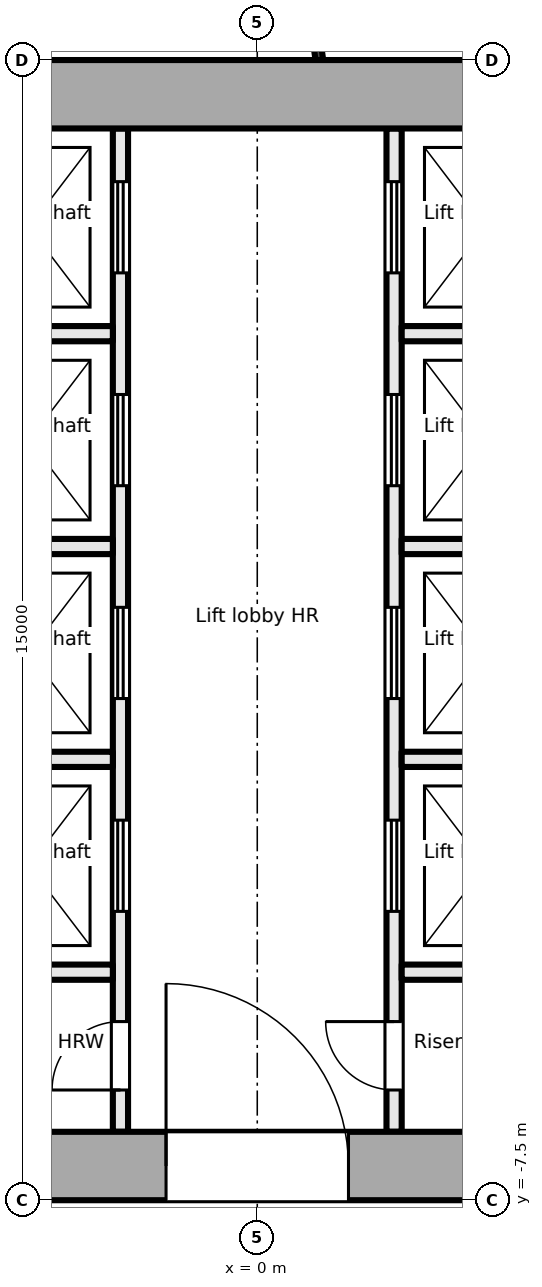
"""IFC4 building model, lengths in metres.
Left out: names, types, materials, properties, quantities, classifications, styles, units other than length and angle.
Written with IfcOpenShell. Run it as: python <this file> out.ifc"""

import sys

from ifc_helpers import new_model, si_unit, direction, frame, frame_2d, origin, place, context, subcontext, project, spatial, rectangle, extrude, element, fill, save


model = new_model("IFC4")
c1 = context("Model", 3, precision=1e-05, world=origin(), true_north=direction((0.0, 1.0)))
c2 = subcontext(c1, "Body", "Model", "MODEL_VIEW")
j1 = project(units=[si_unit("LENGTHUNIT", "METRE"), si_unit("PLANEANGLEUNIT", "RADIAN")], contexts=[c1])
p1 = place(None, origin())
s1 = spatial("IfcSite", under=j1, at=p1, CompositionType="ELEMENT")
p2 = place(p1, origin())
s2 = spatial("IfcBuilding", under=s1, at=p2, CompositionType="ELEMENT")
p3 = place(p2, frame((0.0, 0.0, 176.3)))
s3 = spatial("IfcBuildingStorey", under=s2, at=p3, CompositionType="ELEMENT", Elevation=176.3)
p4 = place(p3, frame((-18.0, -7.05, -0.2), z_axis=(0.0, 0.0, 1.0), x_axis=(1.0, 0.0, 0.0)))
e1 = element("IfcWall", 1, at=p4, inside=s3, PredefinedType="SHEAR", context=c2, shape_type="SweptSolid", body=[
    extrude(rectangle(XDim=36.0, YDim=0.9, at=frame_2d((18.0, 0.0))), origin(), (0.0, 0.0, 1.0), 3.9),
])
p5 = place(p4, frame((8.1, 0.0, 0.2)))
e2 = element("IfcOpeningElement", 2, at=p5, cuts=e1, PredefinedType="OPENING", context=c2, shape_type="SweptSolid", body=[
    extrude(rectangle(XDim=1.8, YDim=2.1, at=frame_2d((0.9, 1.05))), frame((0.0, 0.46, 0.0), z_axis=(0.0, -1.0, 0.0), x_axis=(1.0, 0.0, 0.0)), (0.0, 0.0, 1.0), 0.921),
])
p6 = place(p4, frame((16.8, 0.0, 0.2)))
e3 = element("IfcOpeningElement", 3, at=p6, cuts=e1, PredefinedType="OPENING", context=c2, shape_type="SweptSolid", body=[
    extrude(rectangle(XDim=2.4, YDim=2.1, at=frame_2d((1.2, 1.05))), frame((0.0, 0.46, 0.0), z_axis=(0.0, -1.0, 0.0), x_axis=(1.0, 0.0, 0.0)), (0.0, 0.0, 1.0), 0.921),
])
p7 = place(p4, frame((26.1, 0.0, 0.2)))
e4 = element("IfcOpeningElement", 4, at=p7, cuts=e1, PredefinedType="OPENING", context=c2, shape_type="SweptSolid", body=[
    extrude(rectangle(XDim=2.4, YDim=2.1, at=frame_2d((1.2, 1.05))), frame((0.0, 0.46, 0.0), z_axis=(0.0, -1.0, 0.0), x_axis=(1.0, 0.0, 0.0)), (0.0, 0.0, 1.0), 0.921),
])
p8 = place(p3, frame((-18.0, 7.05, -0.2), z_axis=(0.0, 0.0, 1.0), x_axis=(1.0, 0.0, 0.0)))
e5 = element("IfcWall", 5, at=p8, inside=s3, PredefinedType="SHEAR", context=c2, shape_type="SweptSolid", body=[
    extrude(rectangle(XDim=36.0, YDim=0.9, at=frame_2d((18.0, 0.0))), origin(), (0.0, 0.0, 1.0), 3.9),
])
p9 = place(p3, frame((-1.8, -6.6, 0.0), z_axis=(0.0, 0.0, 1.0), x_axis=(0.0, 1.0, 0.0)))
e6 = element("IfcWall", 6, at=p9, inside=s3, PredefinedType="PARTITIONING", context=c2, shape_type="SweptSolid", body=[
    extrude(rectangle(XDim=13.2, YDim=0.2, at=frame_2d((6.6, 0.0))), origin(), (0.0, 0.0, 1.0), 3.7),
])
p10 = place(p9, frame((0.55, 0.0, 0.0)))
e7 = element("IfcOpeningElement", 7, at=p10, cuts=e6, PredefinedType="OPENING", context=c2, shape_type="SweptSolid", body=[
    extrude(rectangle(XDim=0.9, YDim=2.1, at=frame_2d((0.45, 1.05))), frame((0.0, 0.111, 0.0), z_axis=(0.0, -1.0, 0.0), x_axis=(1.0, 0.0, 0.0)), (0.0, 0.0, 1.0), 0.221),
])
p11 = place(p9, frame((2.9, 0.0, 0.0)))
e8 = element("IfcOpeningElement", 8, at=p11, cuts=e6, PredefinedType="OPENING", context=c2, shape_type="SweptSolid", body=[
    extrude(rectangle(XDim=1.2, YDim=2.1, at=frame_2d((0.6, 1.05))), frame((0.0, 0.111, 0.0), z_axis=(0.0, -1.0, 0.0), x_axis=(1.0, 0.0, 0.0)), (0.0, 0.0, 1.0), 0.221),
])
p12 = place(p9, frame((5.7, 0.0, 0.0)))
e9 = element("IfcOpeningElement", 9, at=p12, cuts=e6, PredefinedType="OPENING", context=c2, shape_type="SweptSolid", body=[
    extrude(rectangle(XDim=1.2, YDim=2.1, at=frame_2d((0.6, 1.05))), frame((0.0, 0.111, 0.0), z_axis=(0.0, -1.0, 0.0), x_axis=(1.0, 0.0, 0.0)), (0.0, 0.0, 1.0), 0.221),
])
p13 = place(p9, frame((8.5, 0.0, 0.0)))
e10 = element("IfcOpeningElement", 10, at=p13, cuts=e6, PredefinedType="OPENING", context=c2, shape_type="SweptSolid", body=[
    extrude(rectangle(XDim=1.2, YDim=2.1, at=frame_2d((0.6, 1.05))), frame((0.0, 0.111, 0.0), z_axis=(0.0, -1.0, 0.0), x_axis=(1.0, 0.0, 0.0)), (0.0, 0.0, 1.0), 0.221),
])
p14 = place(p9, frame((11.3, 0.0, 0.0)))
e11 = element("IfcOpeningElement", 11, at=p14, cuts=e6, PredefinedType="OPENING", context=c2, shape_type="SweptSolid", body=[
    extrude(rectangle(XDim=1.2, YDim=2.1, at=frame_2d((0.6, 1.05))), frame((0.0, 0.111, 0.0), z_axis=(0.0, -1.0, 0.0), x_axis=(1.0, 0.0, 0.0)), (0.0, 0.0, 1.0), 0.221),
])
p15 = place(p3, frame((1.8, -6.6, 0.0), z_axis=(0.0, 0.0, 1.0), x_axis=(0.0, 1.0, 0.0)))
e12 = element("IfcWall", 12, at=p15, inside=s3, PredefinedType="PARTITIONING", context=c2, shape_type="SweptSolid", body=[
    extrude(rectangle(XDim=13.2, YDim=0.2, at=frame_2d((6.6, 0.0))), origin(), (0.0, 0.0, 1.0), 3.7),
])
p16 = place(p15, frame((0.55, 0.0, 0.0)))
e13 = element("IfcOpeningElement", 13, at=p16, cuts=e12, PredefinedType="OPENING", context=c2, shape_type="SweptSolid", body=[
    extrude(rectangle(XDim=0.9, YDim=2.1, at=frame_2d((0.45, 1.05))), frame((0.0, 0.111, 0.0), z_axis=(0.0, -1.0, 0.0), x_axis=(1.0, 0.0, 0.0)), (0.0, 0.0, 1.0), 0.221),
])
p17 = place(p15, frame((2.9, 0.0, 0.0)))
e14 = element("IfcOpeningElement", 14, at=p17, cuts=e12, PredefinedType="OPENING", context=c2, shape_type="SweptSolid", body=[
    extrude(rectangle(XDim=1.2, YDim=2.1, at=frame_2d((0.6, 1.05))), frame((0.0, 0.111, 0.0), z_axis=(0.0, -1.0, 0.0), x_axis=(1.0, 0.0, 0.0)), (0.0, 0.0, 1.0), 0.221),
])
p18 = place(p15, frame((5.7, 0.0, 0.0)))
e15 = element("IfcOpeningElement", 15, at=p18, cuts=e12, PredefinedType="OPENING", context=c2, shape_type="SweptSolid", body=[
    extrude(rectangle(XDim=1.2, YDim=2.1, at=frame_2d((0.6, 1.05))), frame((0.0, 0.111, 0.0), z_axis=(0.0, -1.0, 0.0), x_axis=(1.0, 0.0, 0.0)), (0.0, 0.0, 1.0), 0.221),
])
p19 = place(p15, frame((8.5, 0.0, 0.0)))
e16 = element("IfcOpeningElement", 16, at=p19, cuts=e12, PredefinedType="OPENING", context=c2, shape_type="SweptSolid", body=[
    extrude(rectangle(XDim=1.2, YDim=2.1, at=frame_2d((0.6, 1.05))), frame((0.0, 0.111, 0.0), z_axis=(0.0, -1.0, 0.0), x_axis=(1.0, 0.0, 0.0)), (0.0, 0.0, 1.0), 0.221),
])
p20 = place(p15, frame((11.3, 0.0, 0.0)))
e17 = element("IfcOpeningElement", 17, at=p20, cuts=e12, PredefinedType="OPENING", context=c2, shape_type="SweptSolid", body=[
    extrude(rectangle(XDim=1.2, YDim=2.1, at=frame_2d((0.6, 1.05))), frame((0.0, 0.111, 0.0), z_axis=(0.0, -1.0, 0.0), x_axis=(1.0, 0.0, 0.0)), (0.0, 0.0, 1.0), 0.221),
])
for number, where, z_axis, x_axis in (
    (18, (-4.2, -1.7, 0.0), (0.0, 0.0, 1.0), (1.0, 0.0, 0.0)),
    (19, (-4.2, 1.1, 0.0), (0.0, 0.0, 1.0), (1.0, 0.0, 0.0)),
    (20, (-4.2, 3.9, 0.0), (0.0, 0.0, 1.0), (1.0, 0.0, 0.0)),
    (21, (-4.2, -4.5, 0.0), (0.0, 0.0, 1.0), (1.0, 0.0, 0.0)),
    (22, (1.9, -1.7, 0.0), (0.0, 0.0, 1.0), (1.0, 0.0, 0.0)),
    (23, (1.9, 1.1, 0.0), (0.0, 0.0, 1.0), (1.0, 0.0, 0.0)),
    (24, (1.9, 3.9, 0.0), (0.0, 0.0, 1.0), (1.0, 0.0, 0.0)),
    (25, (1.9, -4.5, 0.0), (0.0, 0.0, 1.0), (1.0, 0.0, 0.0)),
):
    element("IfcWall", number, at=place(p3, frame(where, z_axis=z_axis, x_axis=x_axis)), inside=s3, PredefinedType="PARTITIONING", context=c2, shape_type="SweptSolid", body=[
        extrude(rectangle(XDim=2.3, YDim=0.2, at=frame_2d((1.15, 0.0))), origin(), (0.0, 0.0, 1.0), 3.7),
    ])
p21 = place(p3, frame((0.817, 7.5, 0.0), z_axis=(0.0, 0.0, 1.0), x_axis=(-0.139230432727, 0.990260009595, 0.0)))
e26 = element("IfcWall", 26, at=p21, inside=s3, PredefinedType="PARTITIONING", context=c2, shape_type="SweptSolid", body=[
    extrude(rectangle(XDim=3.526, YDim=0.1, at=frame_2d((1.763, 0.0))), origin(), (0.0, 0.0, 1.0), 3.7),
])
p22 = place(p10, origin())
e27 = element("IfcDoor", 27, at=p22, inside=s3, OperationType="SINGLE_SWING_LEFT", PredefinedType="DOOR", context=c2, shape_type="SweptSolid", body=[
    extrude(rectangle(XDim=0.9, YDim=2.1, at=frame_2d((0.45, 1.05))), frame((0.0, 0.025, 0.0), z_axis=(0.0, -1.0, 0.0), x_axis=(1.0, 0.0, 0.0)), (0.0, 0.0, 1.0), 0.05),
])
fill(e7, e27)
p23 = place(p11, origin())
e28 = element("IfcDoor", 28, at=p23, inside=s3, OperationType="DOUBLE_DOOR_SLIDING", PredefinedType="DOOR", context=c2, shape_type="SweptSolid", body=[
    extrude(rectangle(XDim=1.2, YDim=2.1, at=frame_2d((0.6, 1.05))), frame((0.0, 0.025, 0.0), z_axis=(0.0, -1.0, 0.0), x_axis=(1.0, 0.0, 0.0)), (0.0, 0.0, 1.0), 0.05),
])
fill(e8, e28)
p24 = place(p12, origin())
e29 = element("IfcDoor", 29, at=p24, inside=s3, OperationType="DOUBLE_DOOR_SLIDING", PredefinedType="DOOR", context=c2, shape_type="SweptSolid", body=[
    extrude(rectangle(XDim=1.2, YDim=2.1, at=frame_2d((0.6, 1.05))), frame((0.0, 0.025, 0.0), z_axis=(0.0, -1.0, 0.0), x_axis=(1.0, 0.0, 0.0)), (0.0, 0.0, 1.0), 0.05),
])
fill(e9, e29)
p25 = place(p13, origin())
e30 = element("IfcDoor", 30, at=p25, inside=s3, OperationType="DOUBLE_DOOR_SLIDING", PredefinedType="DOOR", context=c2, shape_type="SweptSolid", body=[
    extrude(rectangle(XDim=1.2, YDim=2.1, at=frame_2d((0.6, 1.05))), frame((0.0, 0.025, 0.0), z_axis=(0.0, -1.0, 0.0), x_axis=(1.0, 0.0, 0.0)), (0.0, 0.0, 1.0), 0.05),
])
fill(e10, e30)
p26 = place(p14, origin())
e31 = element("IfcDoor", 31, at=p26, inside=s3, OperationType="DOUBLE_DOOR_SLIDING", PredefinedType="DOOR", context=c2, shape_type="SweptSolid", body=[
    extrude(rectangle(XDim=1.2, YDim=2.1, at=frame_2d((0.6, 1.05))), frame((0.0, 0.025, 0.0), z_axis=(0.0, -1.0, 0.0), x_axis=(1.0, 0.0, 0.0)), (0.0, 0.0, 1.0), 0.05),
])
fill(e11, e31)
p27 = place(p16, origin())
e32 = element("IfcDoor", 32, at=p27, inside=s3, OperationType="SINGLE_SWING_RIGHT", PredefinedType="DOOR", context=c2, shape_type="SweptSolid", body=[
    extrude(rectangle(XDim=0.9, YDim=2.1, at=frame_2d((0.45, 1.05))), frame((0.0, 0.025, 0.0), z_axis=(0.0, -1.0, 0.0), x_axis=(1.0, 0.0, 0.0)), (0.0, 0.0, 1.0), 0.05),
])
fill(e13, e32)
p28 = place(p17, origin())
e33 = element("IfcDoor", 33, at=p28, inside=s3, OperationType="DOUBLE_DOOR_SLIDING", PredefinedType="DOOR", context=c2, shape_type="SweptSolid", body=[
    extrude(rectangle(XDim=1.2, YDim=2.1, at=frame_2d((0.6, 1.05))), frame((0.0, 0.025, 0.0), z_axis=(0.0, -1.0, 0.0), x_axis=(1.0, 0.0, 0.0)), (0.0, 0.0, 1.0), 0.05),
])
fill(e14, e33)
p29 = place(p18, origin())
e34 = element("IfcDoor", 34, at=p29, inside=s3, OperationType="DOUBLE_DOOR_SLIDING", PredefinedType="DOOR", context=c2, shape_type="SweptSolid", body=[
    extrude(rectangle(XDim=1.2, YDim=2.1, at=frame_2d((0.6, 1.05))), frame((0.0, 0.025, 0.0), z_axis=(0.0, -1.0, 0.0), x_axis=(1.0, 0.0, 0.0)), (0.0, 0.0, 1.0), 0.05),
])
fill(e15, e34)
p30 = place(p19, origin())
e35 = element("IfcDoor", 35, at=p30, inside=s3, OperationType="DOUBLE_DOOR_SLIDING", PredefinedType="DOOR", context=c2, shape_type="SweptSolid", body=[
    extrude(rectangle(XDim=1.2, YDim=2.1, at=frame_2d((0.6, 1.05))), frame((0.0, 0.025, 0.0), z_axis=(0.0, -1.0, 0.0), x_axis=(1.0, 0.0, 0.0)), (0.0, 0.0, 1.0), 0.05),
])
fill(e16, e35)
p31 = place(p20, origin())
e36 = element("IfcDoor", 36, at=p31, inside=s3, OperationType="DOUBLE_DOOR_SLIDING", PredefinedType="DOOR", context=c2, shape_type="SweptSolid", body=[
    extrude(rectangle(XDim=1.2, YDim=2.1, at=frame_2d((0.6, 1.05))), frame((0.0, 0.025, 0.0), z_axis=(0.0, -1.0, 0.0), x_axis=(1.0, 0.0, 0.0)), (0.0, 0.0, 1.0), 0.05),
])
fill(e17, e36)
p32 = place(p6, origin())
e37 = element("IfcDoor", 37, at=p32, inside=s3, OperationType="DOUBLE_DOOR_DOUBLE_SWING", PredefinedType="DOOR", context=c2, shape_type="SweptSolid", body=[
    extrude(rectangle(XDim=2.4, YDim=2.1, at=frame_2d((1.2, 1.05))), frame((0.0, 0.025, 0.0), z_axis=(0.0, -1.0, 0.0), x_axis=(1.0, 0.0, 0.0)), (0.0, 0.0, 1.0), 0.05),
])
fill(e3, e37)
save(model, sys.argv[1])
